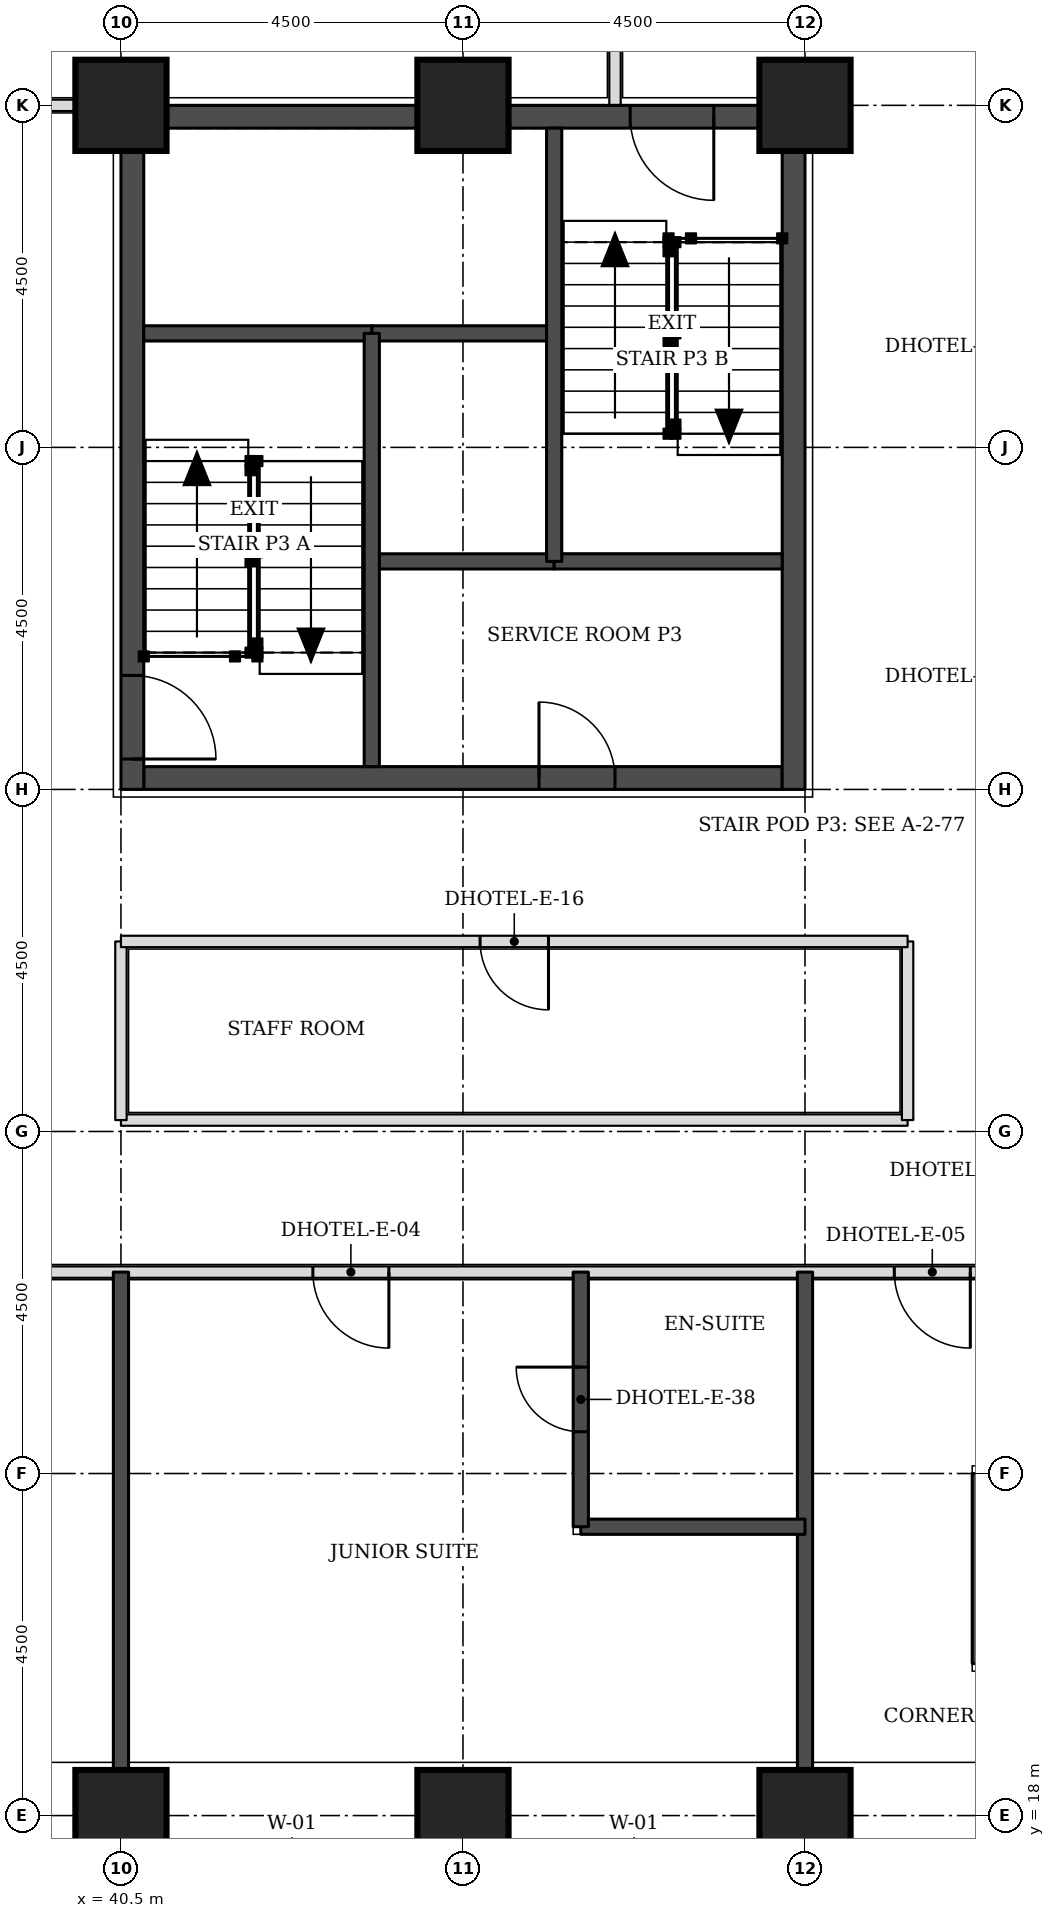
"""IFC4 building model, lengths in metres.
Left out: names, types, materials, properties, quantities, classifications, styles, units other than length and angle.
Written with IfcOpenShell. Run it as: python <this file> out.ifc"""

import sys

from ifc_helpers import new_model, si_unit, direction, frame, frame_2d, origin, origin_2d, place, context, subcontext, project, spatial, rectangle, extrude, element, fill, save


model = new_model("IFC4")
c1 = context("Model", 3, precision=1e-05, world=origin(), true_north=direction((0.0, 1.0)))
c2 = subcontext(c1, "Body", "Model", "MODEL_VIEW")
j1 = project(units=[si_unit("LENGTHUNIT", "METRE"), si_unit("PLANEANGLEUNIT", "RADIAN")], contexts=[c1])
p1 = place(None, origin())
s1 = spatial("IfcSite", under=j1, at=p1, CompositionType="ELEMENT")
p2 = place(p1, origin())
s2 = spatial("IfcBuilding", under=s1, at=p2, CompositionType="ELEMENT")
p3 = place(p2, frame((0.0, 0.0, 39.6)))
s3 = spatial("IfcBuildingStorey", under=s2, at=p3, CompositionType="ELEMENT", Elevation=39.6)
for number, where, z_axis, x_axis in (
    (1, (40.5, 18.0, 0.0), (0.0, 0.0, 1.0), (1.0, 0.0, 0.0)),
    (2, (45.0, 18.0, 0.0), (0.0, 0.0, 1.0), (1.0, 0.0, 0.0)),
    (3, (49.5, 18.0, 0.0), (0.0, 0.0, 1.0), (1.0, 0.0, 0.0)),
    (4, (40.5, 40.5, 0.0), (0.0, 0.0, 1.0), (1.0, 0.0, 0.0)),
    (5, (45.0, 40.5, 0.0), (0.0, 0.0, 1.0), (1.0, 0.0, 0.0)),
    (6, (49.5, 40.5, 0.0), (0.0, 0.0, 1.0), (1.0, 0.0, 0.0)),
):
    element("IfcColumn", number, at=place(p3, frame(where, z_axis=z_axis, x_axis=x_axis)), inside=s3, PredefinedType="COLUMN", context=c2, shape_type="SweptSolid", body=[
        extrude(rectangle(XDim=1.2, YDim=1.2, at=origin_2d()), origin(), (0.0, 0.0, 1.0), 3.3),
    ])
p4 = place(p3, frame((40.8, 31.65, 0.0), z_axis=(0.0, 0.0, 1.0), x_axis=(1.0, 0.0, 0.0)))
e7 = element("IfcWall", 7, at=p4, inside=s3, PredefinedType="SHEAR", context=c2, shape_type="SweptSolid", body=[
    extrude(rectangle(XDim=8.4, YDim=0.3, at=frame_2d((4.2, 0.0))), origin(), (0.0, 0.0, 1.0), 3.3),
])
p5 = place(p4, frame((5.2, 0.0, 0.0)))
e8 = element("IfcOpeningElement", 8, at=p5, cuts=e7, PredefinedType="OPENING", context=c2, shape_type="SweptSolid", body=[
    extrude(rectangle(XDim=1.0, YDim=2.1, at=frame_2d((0.5, 1.05))), frame((0.0, 0.16, 0.0), z_axis=(0.0, -1.0, 0.0), x_axis=(1.0, 0.0, 0.0)), (0.0, 0.0, 1.0), 0.32),
])
p6 = place(p3, frame((40.8, 40.35, 0.0), z_axis=(0.0, 0.0, 1.0), x_axis=(1.0, 0.0, 0.0)))
e9 = element("IfcWall", 9, at=p6, inside=s3, PredefinedType="SHEAR", context=c2, shape_type="SweptSolid", body=[
    extrude(rectangle(XDim=8.4, YDim=0.3, at=frame_2d((4.2, 0.0))), origin(), (0.0, 0.0, 1.0), 3.3),
])
p7 = place(p6, frame((6.4, 0.0, 0.0)))
e10 = element("IfcOpeningElement", 10, at=p7, cuts=e9, PredefinedType="OPENING", context=c2, shape_type="SweptSolid", body=[
    extrude(rectangle(XDim=1.1, YDim=2.1, at=frame_2d((0.55, 1.05))), frame((0.0, 0.16, 0.0), z_axis=(0.0, -1.0, 0.0), x_axis=(1.0, 0.0, 0.0)), (0.0, 0.0, 1.0), 0.32),
])
p8 = place(p3, frame((40.65, 31.5, 0.0), z_axis=(0.0, 0.0, 1.0), x_axis=(0.0, 1.0, 0.0)))
e11 = element("IfcWall", 11, at=p8, inside=s3, PredefinedType="SHEAR", context=c2, shape_type="SweptSolid", body=[
    extrude(rectangle(XDim=9.0, YDim=0.3, at=frame_2d((4.5, 0.0))), origin(), (0.0, 0.0, 1.0), 3.3),
])
p9 = place(p8, frame((0.4, 0.0, 0.0)))
e12 = element("IfcOpeningElement", 12, at=p9, cuts=e11, PredefinedType="OPENING", context=c2, shape_type="SweptSolid", body=[
    extrude(rectangle(XDim=1.1, YDim=2.1, at=frame_2d((0.55, 1.05))), frame((0.0, 0.16, 0.0), z_axis=(0.0, -1.0, 0.0), x_axis=(1.0, 0.0, 0.0)), (0.0, 0.0, 1.0), 0.32),
])
p10 = place(p3, frame((49.35, 31.5, 0.0), z_axis=(0.0, 0.0, 1.0), x_axis=(0.0, 1.0, 0.0)))
e13 = element("IfcWall", 13, at=p10, inside=s3, PredefinedType="SHEAR", context=c2, shape_type="SweptSolid", body=[
    extrude(rectangle(XDim=9.0, YDim=0.3, at=frame_2d((4.5, 0.0))), origin(), (0.0, 0.0, 1.0), 3.3),
])
p11 = place(p3, frame((20.65, 25.15, 0.0), z_axis=(0.0, 0.0, 1.0), x_axis=(1.0, 0.0, 0.0)))
e14 = element("IfcWall", 14, at=p11, inside=s3, PredefinedType="PARTITIONING", context=c2, shape_type="SweptSolid", body=[
    extrude(rectangle(XDim=32.2, YDim=0.15, at=frame_2d((16.1, 0.0))), origin(), (0.0, 0.0, 1.0), 3.08),
])
p12 = place(p11, frame((4.375, 0.0, 0.0)))
e15 = element("IfcOpeningElement", 15, at=p12, cuts=e14, PredefinedType="OPENING", context=c2, shape_type="SweptSolid", body=[
    extrude(rectangle(XDim=1.0, YDim=2.1, at=frame_2d((0.5, 1.05))), frame((0.0, 0.085, 0.0), z_axis=(0.0, -1.0, 0.0), x_axis=(1.0, 0.0, 0.0)), (0.0, 0.0, 1.0), 0.17),
])
p13 = place(p11, frame((16.075, 0.0, 0.0)))
e16 = element("IfcOpeningElement", 16, at=p13, cuts=e14, PredefinedType="OPENING", context=c2, shape_type="SweptSolid", body=[
    extrude(rectangle(XDim=1.0, YDim=2.1, at=frame_2d((0.5, 1.05))), frame((0.0, 0.085, 0.0), z_axis=(0.0, -1.0, 0.0), x_axis=(1.0, 0.0, 0.0)), (0.0, 0.0, 1.0), 0.17),
])
p14 = place(p11, frame((22.375, 0.0, 0.0)))
e17 = element("IfcOpeningElement", 17, at=p14, cuts=e14, PredefinedType="OPENING", context=c2, shape_type="SweptSolid", body=[
    extrude(rectangle(XDim=1.0, YDim=2.1, at=frame_2d((0.5, 1.05))), frame((0.0, 0.085, 0.0), z_axis=(0.0, -1.0, 0.0), x_axis=(1.0, 0.0, 0.0)), (0.0, 0.0, 1.0), 0.17),
])
p15 = place(p11, frame((0.425, 0.0, 0.0)))
e18 = element("IfcOpeningElement", 18, at=p15, cuts=e14, PredefinedType="OPENING", context=c2, shape_type="SweptSolid", body=[
    extrude(rectangle(XDim=1.0, YDim=2.1, at=frame_2d((0.5, 1.05))), frame((0.0, 0.085, 0.0), z_axis=(0.0, -1.0, 0.0), x_axis=(1.0, 0.0, 0.0)), (0.0, 0.0, 1.0), 0.17),
])
p16 = place(p11, frame((30.025, 0.0, 0.0)))
e19 = element("IfcOpeningElement", 19, at=p16, cuts=e14, PredefinedType="OPENING", context=c2, shape_type="SweptSolid", body=[
    extrude(rectangle(XDim=1.0, YDim=2.1, at=frame_2d((0.5, 1.05))), frame((0.0, 0.085, 0.0), z_axis=(0.0, -1.0, 0.0), x_axis=(1.0, 0.0, 0.0)), (0.0, 0.0, 1.0), 0.17),
])
p17 = place(p3, frame((40.5, 27.15, 0.0), z_axis=(0.0, 0.0, 1.0), x_axis=(1.0, 0.0, 0.0)))
e20 = element("IfcWall", 20, at=p17, inside=s3, PredefinedType="PARTITIONING", context=c2, shape_type="SweptSolid", body=[
    extrude(rectangle(XDim=10.35, YDim=0.15, at=frame_2d((5.175, 0.0))), origin(), (0.0, 0.0, 1.0), 3.08),
])
for number, where, z_axis, x_axis in (
    (21, (40.5, 27.15, 0.0), (0.0, 0.0, 1.0), (0.0, 1.0, 0.0)),
    (22, (50.85, 27.15, 0.0), (0.0, 0.0, 1.0), (0.0, 1.0, 0.0)),
):
    element("IfcWall", number, at=place(p3, frame(where, z_axis=z_axis, x_axis=x_axis)), inside=s3, PredefinedType="PARTITIONING", context=c2, shape_type="SweptSolid", body=[
        extrude(rectangle(XDim=2.35, YDim=0.15, at=frame_2d((1.175, 0.0))), origin(), (0.0, 0.0, 1.0), 3.08),
    ])
p18 = place(p3, frame((40.5, 29.5, 0.0), z_axis=(0.0, 0.0, 1.0), x_axis=(1.0, 0.0, 0.0)))
e23 = element("IfcWall", 23, at=p18, inside=s3, PredefinedType="PARTITIONING", context=c2, shape_type="SweptSolid", body=[
    extrude(rectangle(XDim=10.35, YDim=0.15, at=frame_2d((5.175, 0.0))), origin(), (0.0, 0.0, 1.0), 3.08),
])
p19 = place(p18, frame((4.725, 0.0, 0.0)))
e24 = element("IfcOpeningElement", 24, at=p19, cuts=e23, PredefinedType="OPENING", context=c2, shape_type="SweptSolid", body=[
    extrude(rectangle(XDim=0.9, YDim=2.1, at=frame_2d((0.45, 1.05))), frame((0.0, 0.085, 0.0), z_axis=(0.0, -1.0, 0.0), x_axis=(1.0, 0.0, 0.0)), (0.0, 0.0, 1.0), 0.17),
])
p20 = place(p3, frame((38.5, 40.5, 0.0), z_axis=(0.0, 0.0, 1.0), x_axis=(1.0, 0.0, 0.0)))
e25 = element("IfcWall", 25, at=p20, inside=s3, PredefinedType="PARTITIONING", context=c2, shape_type="SweptSolid", body=[
    extrude(rectangle(XDim=1.95, YDim=0.15, at=frame_2d((0.975, 0.0))), origin(), (0.0, 0.0, 1.0), 2.33),
])
p21 = place(p3, frame((47.0, 40.5, 0.0), z_axis=(0.0, 0.0, 1.0), x_axis=(0.0, 1.0, 0.0)))
e26 = element("IfcWall", 26, at=p21, inside=s3, PredefinedType="PARTITIONING", context=c2, shape_type="SweptSolid", body=[
    extrude(rectangle(XDim=7.0, YDim=0.15, at=frame_2d((3.5, 0.0))), origin(), (0.0, 0.0, 1.0), 3.08),
])
p22 = place(p21, frame((3.05, 0.0, 0.0)))
e27 = element("IfcOpeningElement", 27, at=p22, cuts=e26, PredefinedType="OPENING", context=c2, shape_type="SweptSolid", body=[
    extrude(rectangle(XDim=0.9, YDim=2.1, at=frame_2d((0.45, 1.05))), frame((0.0, 0.085, 0.0), z_axis=(0.0, -1.0, 0.0), x_axis=(1.0, 0.0, 0.0)), (0.0, 0.0, 1.0), 0.17),
])
for number, where, z_axis, x_axis in (
    (28, (40.5, 18.6, 0.0), (0.0, 0.0, 1.0), (0.0, 1.0, 0.0)),
    (29, (49.5, 18.6, 0.0), (0.0, 0.0, 1.0), (0.0, 1.0, 0.0)),
):
    element("IfcWall", number, at=place(p3, frame(where, z_axis=z_axis, x_axis=x_axis)), inside=s3, PredefinedType="SOLIDWALL", context=c2, shape_type="SweptSolid", body=[
        extrude(rectangle(XDim=6.55, YDim=0.2, at=frame_2d((3.275, 0.0))), origin(), (0.0, 0.0, 1.0), 3.08),
    ])
p23 = place(p3, frame((51.8, 20.0, 0.0), z_axis=(0.0, 0.0, 1.0), x_axis=(0.0, 1.0, 0.0)))
e30 = element("IfcWall", 30, at=p23, inside=s3, PredefinedType="SOLIDWALL", context=c2, shape_type="SweptSolid", body=[
    extrude(rectangle(XDim=2.5, YDim=0.2, at=frame_2d((1.25, 0.0))), origin(), (0.0, 0.0, 1.0), 3.08),
])
p24 = place(p3, frame((46.55, 21.8, 0.0), z_axis=(0.0, 0.0, 1.0), x_axis=(1.0, 0.0, 0.0)))
e31 = element("IfcWall", 31, at=p24, inside=s3, PredefinedType="SOLIDWALL", context=c2, shape_type="SweptSolid", body=[
    extrude(rectangle(XDim=2.95, YDim=0.2, at=frame_2d((1.475, 0.0))), origin(), (0.0, 0.0, 1.0), 3.08),
])
p25 = place(p3, frame((46.55, 21.8, 0.0), z_axis=(0.0, 0.0, 1.0), x_axis=(0.0, 1.0, 0.0)))
e32 = element("IfcWall", 32, at=p25, inside=s3, PredefinedType="SOLIDWALL", context=c2, shape_type="SweptSolid", body=[
    extrude(rectangle(XDim=3.35, YDim=0.2, at=frame_2d((1.675, 0.0))), origin(), (0.0, 0.0, 1.0), 3.08),
])
p26 = place(p25, frame((1.25, 0.0, 0.0)))
e33 = element("IfcOpeningElement", 33, at=p26, cuts=e32, PredefinedType="OPENING", context=c2, shape_type="SweptSolid", body=[
    extrude(rectangle(XDim=0.85, YDim=2.1, at=frame_2d((0.425, 1.05))), frame((0.0, 0.11, 0.0), z_axis=(0.0, -1.0, 0.0), x_axis=(1.0, 0.0, 0.0)), (0.0, 0.0, 1.0), 0.22),
])
p27 = place(p3, frame((43.8, 34.5, 0.0), z_axis=(0.0, 0.0, 1.0), x_axis=(1.0, 0.0, 0.0)))
e34 = element("IfcWall", 34, at=p27, inside=s3, PredefinedType="SOLIDWALL", context=c2, shape_type="SweptSolid", body=[
    extrude(rectangle(XDim=2.4, YDim=0.2, at=frame_2d((1.2, 0.0))), origin(), (0.0, 0.0, 1.0), 3.08),
])
p28 = place(p3, frame((46.2, 34.5, 0.0), z_axis=(0.0, 0.0, 1.0), x_axis=(1.0, 0.0, 0.0)))
e35 = element("IfcWall", 35, at=p28, inside=s3, PredefinedType="SOLIDWALL", context=c2, shape_type="SweptSolid", body=[
    extrude(rectangle(XDim=3.0, YDim=0.2, at=frame_2d((1.5, 0.0))), origin(), (0.0, 0.0, 1.0), 3.08),
])
p29 = place(p3, frame((43.8, 37.5, 0.0), z_axis=(0.0, 0.0, 1.0), x_axis=(1.0, 0.0, 0.0)))
e36 = element("IfcWall", 36, at=p29, inside=s3, PredefinedType="SOLIDWALL", context=c2, shape_type="SweptSolid", body=[
    extrude(rectangle(XDim=2.4, YDim=0.2, at=frame_2d((1.2, 0.0))), origin(), (0.0, 0.0, 1.0), 3.3),
])
p30 = place(p3, frame((40.8, 37.5, 0.0), z_axis=(0.0, 0.0, 1.0), x_axis=(1.0, 0.0, 0.0)))
e37 = element("IfcWall", 37, at=p30, inside=s3, PredefinedType="SOLIDWALL", context=c2, shape_type="SweptSolid", body=[
    extrude(rectangle(XDim=3.0, YDim=0.2, at=frame_2d((1.5, 0.0))), origin(), (0.0, 0.0, 1.0), 3.08),
])
for number, where, z_axis, x_axis in (
    (38, (43.8, 31.8, 0.0), (0.0, 0.0, 1.0), (0.0, 1.0, 0.0)),
    (39, (46.2, 34.5, 0.0), (0.0, 0.0, 1.0), (0.0, 1.0, 0.0)),
):
    element("IfcWall", number, at=place(p3, frame(where, z_axis=z_axis, x_axis=x_axis)), inside=s3, PredefinedType="SOLIDWALL", context=c2, shape_type="SweptSolid", body=[
        extrude(rectangle(XDim=5.7, YDim=0.2, at=frame_2d((2.85, 0.0))), origin(), (0.0, 0.0, 1.0), 3.08),
    ])
p31 = place(p14, frame((1.0, 0.0, 0.0), z_axis=(0.0, 0.0, 1.0), x_axis=(-1.0, 0.0, 0.0)))
e40 = element("IfcDoor", 40, at=p31, inside=s3, OperationType="SINGLE_SWING_LEFT", PredefinedType="DOOR", context=c2, shape_type="SweptSolid", body=[
    extrude(rectangle(XDim=1.0, YDim=2.1, at=frame_2d((0.5, 1.05))), frame((0.0, 0.025, 0.0), z_axis=(0.0, -1.0, 0.0), x_axis=(1.0, 0.0, 0.0)), (0.0, 0.0, 1.0), 0.05),
])
fill(e17, e40)
p32 = place(p26, origin())
e41 = element("IfcDoor", 41, at=p32, inside=s3, OperationType="SINGLE_SWING_RIGHT", PredefinedType="DOOR", context=c2, shape_type="SweptSolid", body=[
    extrude(rectangle(XDim=0.85, YDim=2.1, at=frame_2d((0.425, 1.05))), frame((0.0, 0.025, 0.0), z_axis=(0.0, -1.0, 0.0), x_axis=(1.0, 0.0, 0.0)), (0.0, 0.0, 1.0), 0.05),
])
fill(e33, e41)
p33 = place(p16, frame((1.0, 0.0, 0.0), z_axis=(0.0, 0.0, 1.0), x_axis=(-1.0, 0.0, 0.0)))
e42 = element("IfcDoor", 42, at=p33, inside=s3, OperationType="SINGLE_SWING_LEFT", PredefinedType="DOOR", context=c2, shape_type="SweptSolid", body=[
    extrude(rectangle(XDim=1.0, YDim=2.1, at=frame_2d((0.5, 1.05))), frame((0.0, 0.025, 0.0), z_axis=(0.0, -1.0, 0.0), x_axis=(1.0, 0.0, 0.0)), (0.0, 0.0, 1.0), 0.05),
])
fill(e19, e42)
p34 = place(p19, frame((0.9, 0.0, 0.0), z_axis=(0.0, 0.0, 1.0), x_axis=(-1.0, 0.0, 0.0)))
e43 = element("IfcDoor", 43, at=p34, inside=s3, OperationType="SINGLE_SWING_LEFT", PredefinedType="DOOR", context=c2, shape_type="SweptSolid", body=[
    extrude(rectangle(XDim=0.9, YDim=2.1, at=frame_2d((0.45, 1.05))), frame((0.0, 0.025, 0.0), z_axis=(0.0, -1.0, 0.0), x_axis=(1.0, 0.0, 0.0)), (0.0, 0.0, 1.0), 0.05),
])
fill(e24, e43)
p35 = place(p9, frame((1.1, 0.0, 0.0), z_axis=(0.0, 0.0, 1.0), x_axis=(-1.0, 0.0, 0.0)))
e44 = element("IfcDoor", 44, at=p35, inside=s3, OperationType="SINGLE_SWING_RIGHT", PredefinedType="DOOR", context=c2, shape_type="SweptSolid", body=[
    extrude(rectangle(XDim=1.1, YDim=2.1, at=frame_2d((0.55, 1.05))), frame((0.0, 0.025, 0.0), z_axis=(0.0, -1.0, 0.0), x_axis=(1.0, 0.0, 0.0)), (0.0, 0.0, 1.0), 0.05),
])
fill(e12, e44)
p36 = place(p7, frame((1.1, 0.0, 0.0), z_axis=(0.0, 0.0, 1.0), x_axis=(-1.0, 0.0, 0.0)))
e45 = element("IfcDoor", 45, at=p36, inside=s3, OperationType="SINGLE_SWING_LEFT", PredefinedType="DOOR", context=c2, shape_type="SweptSolid", body=[
    extrude(rectangle(XDim=1.1, YDim=2.1, at=frame_2d((0.55, 1.05))), frame((0.0, 0.025, 0.0), z_axis=(0.0, -1.0, 0.0), x_axis=(1.0, 0.0, 0.0)), (0.0, 0.0, 1.0), 0.05),
])
fill(e10, e45)
p37 = place(p5, origin())
e46 = element("IfcDoor", 46, at=p37, inside=s3, OperationType="SINGLE_SWING_LEFT", PredefinedType="DOOR", context=c2, shape_type="SweptSolid", body=[
    extrude(rectangle(XDim=1.0, YDim=2.1, at=frame_2d((0.5, 1.05))), frame((0.0, 0.025, 0.0), z_axis=(0.0, -1.0, 0.0), x_axis=(1.0, 0.0, 0.0)), (0.0, 0.0, 1.0), 0.05),
])
fill(e8, e46)
save(model, sys.argv[1])
